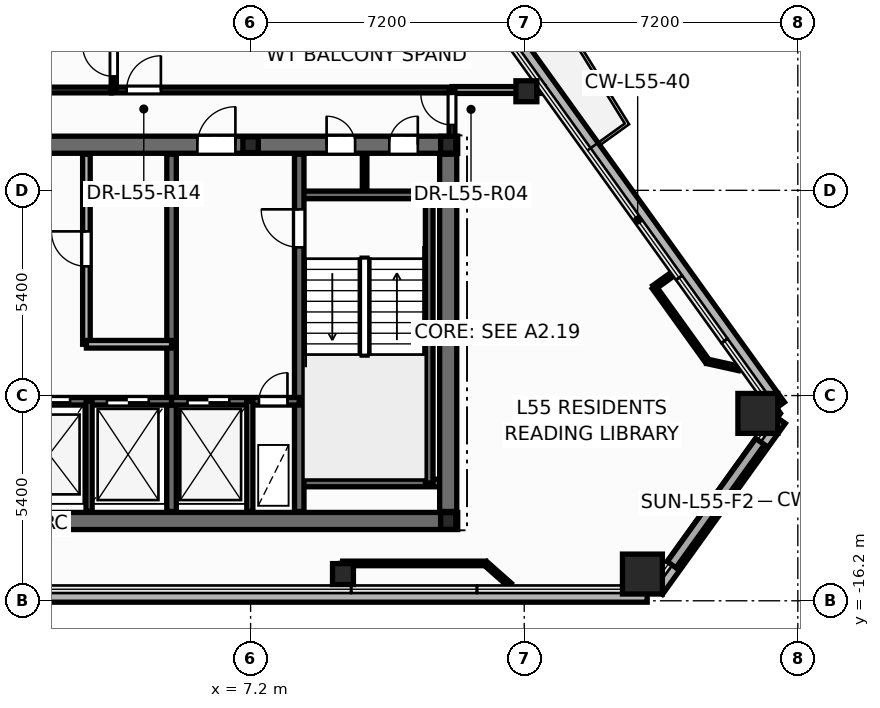
"""IFC4 building model, lengths in metres.
Left out: names, types, materials, properties, quantities, classifications, styles, units other than length and angle.
Written with IfcOpenShell. Run it as: python <this file> out.ifc"""

import sys

from ifc_helpers import new_model, si_unit, direction, frame, frame_2d, origin, origin_2d, place, context, subcontext, project, spatial, rectangle, hollow_rectangle, hollow_circle, i_section, extrude, element, fill, save


model = new_model("IFC4")
c1 = context("Model", 3, precision=1e-05, world=origin(), true_north=direction((0.0, 1.0)))
c2 = subcontext(c1, "Body", "Model", "MODEL_VIEW")
j1 = project(units=[si_unit("LENGTHUNIT", "METRE"), si_unit("PLANEANGLEUNIT", "RADIAN")], contexts=[c1])
p1 = place(None, origin())
s1 = spatial("IfcSite", under=j1, at=p1, CompositionType="ELEMENT")
p2 = place(p1, origin())
s2 = spatial("IfcBuilding", under=s1, at=p2, CompositionType="ELEMENT")
p3 = place(p2, frame((0.0, 0.0, 210.9)))
s3 = spatial("IfcBuildingStorey", under=s2, at=p3, CompositionType="ELEMENT", Elevation=210.9)
for number, where, z_axis, x_axis in (
    (1, (17.511, -15.497, 0.0), (0.0, 0.0, 1.0), (1.0, 0.0, 0.0)),
    (2, (20.548, -11.27, 0.0), (0.0, 0.0, 1.0), (1.0, 0.0, 0.0)),
):
    element("IfcColumn", number, at=place(p3, frame(where, z_axis=z_axis, x_axis=x_axis)), inside=s3, PredefinedType="COLUMN", context=c2, shape_type="SweptSolid", body=[
        extrude(hollow_rectangle(XDim=1.05, YDim=1.05, WallThickness=0.045, at=origin_2d()), origin(), (0.0, 0.0, 1.0), 3.6),
    ])
for number, where, z_axis, x_axis in (
    (3, (9.631, -15.497, 0.0), (0.0, 0.0, 1.0), (1.0, 0.0, 0.0)),
    (4, (14.457, -2.793, 0.0), (0.0, 0.0, 1.0), (1.0, 0.0, 0.0)),
):
    element("IfcColumn", number, at=place(p3, frame(where, z_axis=z_axis, x_axis=x_axis)), inside=s3, PredefinedType="COLUMN", context=c2, shape_type="SweptSolid", body=[
        extrude(hollow_circle(Radius=0.275, WallThickness=0.024, at=origin_2d()), origin(), (0.0, 0.0, 1.0), 3.6),
    ])
for number, where, z_axis, x_axis in (
    (5, (12.4, -14.1, 0.0), (0.0, 0.0, 1.0), (1.0, 0.0, 0.0)),
    (6, (12.4, -4.2, 0.0), (0.0, 0.0, 1.0), (1.0, 0.0, 0.0)),
):
    element("IfcColumn", number, at=place(p3, frame(where, z_axis=z_axis, x_axis=x_axis)), inside=s3, PredefinedType="COLUMN", context=c2, shape_type="SweptSolid", body=[
        extrude(i_section(OverallWidth=0.4, OverallDepth=0.44, WebThickness=0.028, FlangeThickness=0.04, at=origin_2d()), origin(), (0.0, 0.0, 1.0), 3.6),
    ])
p4 = place(p3, frame((7.2, -4.2, 0.0), z_axis=(0.0, 0.0, 1.0), x_axis=(1.0, 0.0, 0.0)))
e7 = element("IfcColumn", 7, at=p4, inside=s3, PredefinedType="PILASTER", context=c2, shape_type="SweptSolid", body=[
    extrude(i_section(OverallWidth=0.405, OverallDepth=0.414, WebThickness=0.022, FlangeThickness=0.032, at=origin_2d()), origin(), (0.0, 0.0, 1.0), 3.6),
])
p5 = place(p3, frame((-17.636, -16.057, -0.2), z_axis=(0.0, 0.0, 1.0), x_axis=(1.0, 0.0, 0.0)))
e8 = element("IfcWall", 8, at=p5, inside=s3, PredefinedType="PARAPET", context=c2, shape_type="SweptSolid", body=[
    extrude(rectangle(XDim=35.272, YDim=0.36, at=frame_2d((17.636, 0.0))), origin(), (0.0, 0.0, 1.0), 0.38),
])
p6 = place(p3, frame((17.893, -15.925, -0.2), z_axis=(0.0, 0.0, 1.0), x_axis=(0.583537933591, 0.812085882195, 0.0)))
e9 = element("IfcWall", 9, at=p6, inside=s3, PredefinedType="PARAPET", context=c2, shape_type="SweptSolid", body=[
    extrude(rectangle(XDim=5.538, YDim=0.36, at=frame_2d((2.769, 0.0))), origin(), (0.0, 0.0, 1.0), 0.38),
])
p7 = place(p3, frame((21.101, -11.079, -0.2), z_axis=(0.0, 0.0, 1.0), x_axis=(-0.583558674799, 0.81207097785, 0.0)))
e10 = element("IfcWall", 10, at=p7, inside=s3, PredefinedType="PARAPET", context=c2, shape_type="SweptSolid", body=[
    extrude(rectangle(XDim=12.289, YDim=0.36, at=frame_2d((6.144, 0.0))), origin(), (0.0, 0.0, 1.0), 0.38),
])
p8 = place(p3, frame((10.2, -5.52, 0.0), z_axis=(0.0, 0.0, 1.0), x_axis=(0.0, 1.0, 0.0)))
e11 = element("IfcWall", 11, at=p8, inside=s3, PredefinedType="PARTITIONING", context=c2, shape_type="SweptSolid", body=[
    extrude(rectangle(XDim=1.12, YDim=0.12, at=frame_2d((0.56, 0.0))), origin(), (0.0, 0.0, 1.0), 3.345),
])
p9 = place(p3, frame((-12.65, -14.1, 0.0), z_axis=(0.0, 0.0, 1.0), x_axis=(1.0, 0.0, 0.0)))
e12 = element("IfcWall", 12, at=p9, inside=s3, PredefinedType="SHEAR", context=c2, shape_type="SweptSolid", body=[
    extrude(rectangle(XDim=25.3, YDim=0.45, at=frame_2d((12.65, 0.0))), origin(), (0.0, 0.0, 1.0), 3.6),
])
p10 = place(p3, frame((-12.65, -4.2, 0.0), z_axis=(0.0, 0.0, 1.0), x_axis=(1.0, 0.0, 0.0)))
e13 = element("IfcWall", 13, at=p10, inside=s3, PredefinedType="SHEAR", context=c2, shape_type="SweptSolid", body=[
    extrude(rectangle(XDim=25.3, YDim=0.45, at=frame_2d((12.65, 0.0))), origin(), (0.0, 0.0, 1.0), 3.6),
])
p11 = place(p10, frame((1.85, 0.0, 0.0)))
e14 = element("IfcOpeningElement", 14, at=p11, cuts=e13, PredefinedType="OPENING", context=c2, shape_type="SweptSolid", body=[
    extrude(rectangle(XDim=0.756, YDim=2.054, at=frame_2d((0.375, 1.027))), frame((0.0, 0.235, 0.0), z_axis=(0.0, -1.0, 0.0), x_axis=(1.0, 0.0, 0.0)), (0.0, 0.0, 1.0), 0.47),
])
p12 = place(p10, frame((21.85, 0.0, 0.0)))
e15 = element("IfcOpeningElement", 15, at=p12, cuts=e13, PredefinedType="OPENING", context=c2, shape_type="SweptSolid", body=[
    extrude(rectangle(XDim=0.756, YDim=2.054, at=frame_2d((0.375, 1.027))), frame((0.0, 0.235, 0.0), z_axis=(0.0, -1.0, 0.0), x_axis=(1.0, 0.0, 0.0)), (0.0, 0.0, 1.0), 0.47),
])
p13 = place(p10, frame((23.5, 0.0, 0.0)))
e16 = element("IfcOpeningElement", 16, at=p13, cuts=e13, PredefinedType="OPENING", context=c2, shape_type="SweptSolid", body=[
    extrude(rectangle(XDim=0.756, YDim=2.054, at=frame_2d((0.375, 1.027))), frame((0.0, 0.235, 0.0), z_axis=(0.0, -1.0, 0.0), x_axis=(1.0, 0.0, 0.0)), (0.0, 0.0, 1.0), 0.47),
])
p14 = place(p10, frame((5.85, 0.0, 0.0)))
e17 = element("IfcOpeningElement", 17, at=p14, cuts=e13, PredefinedType="OPENING", context=c2, shape_type="SweptSolid", body=[
    extrude(rectangle(XDim=1.006, YDim=2.104, at=frame_2d((0.5, 1.052))), frame((0.0, 0.235, 0.0), z_axis=(0.0, -1.0, 0.0), x_axis=(1.0, 0.0, 0.0)), (0.0, 0.0, 1.0), 0.47),
])
p15 = place(p10, frame((10.35, 0.0, 0.0)))
e18 = element("IfcOpeningElement", 18, at=p15, cuts=e13, PredefinedType="OPENING", context=c2, shape_type="SweptSolid", body=[
    extrude(rectangle(XDim=1.406, YDim=2.154, at=frame_2d((0.7, 1.077))), frame((0.0, 0.235, 0.0), z_axis=(0.0, -1.0, 0.0), x_axis=(1.0, 0.0, 0.0)), (0.0, 0.0, 1.0), 0.47),
])
p16 = place(p10, frame((18.45, 0.0, 0.0)))
e19 = element("IfcOpeningElement", 19, at=p16, cuts=e13, PredefinedType="OPENING", context=c2, shape_type="SweptSolid", body=[
    extrude(rectangle(XDim=1.006, YDim=2.104, at=frame_2d((0.5, 1.052))), frame((0.0, 0.235, 0.0), z_axis=(0.0, -1.0, 0.0), x_axis=(1.0, 0.0, 0.0)), (0.0, 0.0, 1.0), 0.47),
])
for number, where, z_axis, x_axis in (
    (20, (8.48, -5.52, 0.0), (0.0, 0.0, 1.0), (1.0, 0.0, 0.0)),
    (21, (8.48, -13.1, 0.0), (0.0, 0.0, 1.0), (1.0, 0.0, 0.0)),
):
    element("IfcWall", number, at=place(p3, frame(where, z_axis=z_axis, x_axis=x_axis)), inside=s3, PredefinedType="SOLIDWALL", context=c2, shape_type="SweptSolid", body=[
        extrude(rectangle(XDim=3.87, YDim=0.2, at=frame_2d((1.935, 0.0))), origin(), (0.0, 0.0, 1.0), 3.6),
    ])
p17 = place(p3, frame((11.9, -13.1, 0.0), z_axis=(0.0, 0.0, 1.0), x_axis=(0.0, 1.0, 0.0)))
e22 = element("IfcWall", 22, at=p17, inside=s3, PredefinedType="SOLIDWALL", context=c2, shape_type="SweptSolid", body=[
    extrude(rectangle(XDim=7.58, YDim=0.2, at=frame_2d((3.79, 0.0))), origin(), (0.0, 0.0, 1.0), 3.6),
])
p18 = place(p3, frame((8.48, -13.85, 0.0), z_axis=(0.0, 0.0, 1.0), x_axis=(0.0, 1.0, 0.0)))
e23 = element("IfcWall", 23, at=p18, inside=s3, PredefinedType="SHEAR", context=c2, shape_type="SweptSolid", body=[
    extrude(rectangle(XDim=9.4, YDim=0.25, at=frame_2d((4.7, 0.0))), origin(), (0.0, 0.0, 1.0), 3.6),
])
p19 = place(p18, frame((6.95, 0.0, 0.0)))
e24 = element("IfcOpeningElement", 24, at=p19, cuts=e23, PredefinedType="OPENING", context=c2, shape_type="SweptSolid", body=[
    extrude(rectangle(XDim=1.006, YDim=2.104, at=frame_2d((0.5, 1.052))), frame((0.0, 0.135, 0.0), z_axis=(0.0, -1.0, 0.0), x_axis=(1.0, 0.0, 0.0)), (0.0, 0.0, 1.0), 0.27),
])
p20 = place(p3, frame((5.12, -13.85, 0.0), z_axis=(0.0, 0.0, 1.0), x_axis=(0.0, 1.0, 0.0)))
e25 = element("IfcWall", 25, at=p20, inside=s3, PredefinedType="SHEAR", context=c2, shape_type="SweptSolid", body=[
    extrude(rectangle(XDim=9.4, YDim=0.25, at=frame_2d((4.7, 0.0))), origin(), (0.0, 0.0, 1.0), 3.6),
])
p21 = place(p3, frame((-5.12, -10.95, 0.0), z_axis=(0.0, 0.0, 1.0), x_axis=(1.0, 0.0, 0.0)))
e26 = element("IfcWall", 26, at=p21, inside=s3, PredefinedType="SOLIDWALL", context=c2, shape_type="SweptSolid", body=[
    extrude(rectangle(XDim=10.24, YDim=0.2, at=frame_2d((5.12, 0.0))), origin(), (0.0, 0.0, 1.0), 3.6),
])
p22 = place(p21, frame((0.6, 0.0, 0.0)))
e27 = element("IfcOpeningElement", 27, at=p22, cuts=e26, PredefinedType="OPENING", context=c2, shape_type="SweptSolid", body=[
    extrude(rectangle(XDim=1.106, YDim=2.104, at=frame_2d((0.55, 1.052))), frame((0.0, 0.11, 0.0), z_axis=(0.0, -1.0, 0.0), x_axis=(1.0, 0.0, 0.0)), (0.0, 0.0, 1.0), 0.22),
])
p23 = place(p21, frame((2.67, 0.0, 0.0)))
e28 = element("IfcOpeningElement", 28, at=p23, cuts=e26, PredefinedType="OPENING", context=c2, shape_type="SweptSolid", body=[
    extrude(rectangle(XDim=1.106, YDim=2.104, at=frame_2d((0.55, 1.052))), frame((0.0, 0.11, 0.0), z_axis=(0.0, -1.0, 0.0), x_axis=(1.0, 0.0, 0.0)), (0.0, 0.0, 1.0), 0.22),
])
p24 = place(p21, frame((4.57, 0.0, 0.0)))
e29 = element("IfcOpeningElement", 29, at=p24, cuts=e26, PredefinedType="OPENING", context=c2, shape_type="SweptSolid", body=[
    extrude(rectangle(XDim=1.106, YDim=2.104, at=frame_2d((0.55, 1.052))), frame((0.0, 0.11, 0.0), z_axis=(0.0, -1.0, 0.0), x_axis=(1.0, 0.0, 0.0)), (0.0, 0.0, 1.0), 0.22),
])
p25 = place(p21, frame((6.47, 0.0, 0.0)))
e30 = element("IfcOpeningElement", 30, at=p25, cuts=e26, PredefinedType="OPENING", context=c2, shape_type="SweptSolid", body=[
    extrude(rectangle(XDim=1.106, YDim=2.104, at=frame_2d((0.55, 1.052))), frame((0.0, 0.11, 0.0), z_axis=(0.0, -1.0, 0.0), x_axis=(1.0, 0.0, 0.0)), (0.0, 0.0, 1.0), 0.22),
])
p26 = place(p21, frame((8.54, 0.0, 0.0)))
e31 = element("IfcOpeningElement", 31, at=p26, cuts=e26, PredefinedType="OPENING", context=c2, shape_type="SweptSolid", body=[
    extrude(rectangle(XDim=1.106, YDim=2.104, at=frame_2d((0.55, 1.052))), frame((0.0, 0.11, 0.0), z_axis=(0.0, -1.0, 0.0), x_axis=(1.0, 0.0, 0.0)), (0.0, 0.0, 1.0), 0.22),
])
p27 = place(p3, frame((5.12, -10.95, 0.0), z_axis=(0.0, 0.0, 1.0), x_axis=(1.0, 0.0, 0.0)))
e32 = element("IfcWall", 32, at=p27, inside=s3, PredefinedType="SOLIDWALL", context=c2, shape_type="SweptSolid", body=[
    extrude(rectangle(XDim=3.36, YDim=0.2, at=frame_2d((1.68, 0.0))), origin(), (0.0, 0.0, 1.0), 3.6),
])
p28 = place(p27, frame((0.42, 0.0, 0.0)))
e33 = element("IfcOpeningElement", 33, at=p28, cuts=e32, PredefinedType="OPENING", context=c2, shape_type="SweptSolid", body=[
    extrude(rectangle(XDim=1.106, YDim=2.104, at=frame_2d((0.55, 1.052))), frame((0.0, 0.11, 0.0), z_axis=(0.0, -1.0, 0.0), x_axis=(1.0, 0.0, 0.0)), (0.0, 0.0, 1.0), 0.22),
])
p29 = place(p27, frame((2.3, 0.0, 0.0)))
e34 = element("IfcOpeningElement", 34, at=p29, cuts=e32, PredefinedType="OPENING", context=c2, shape_type="SweptSolid", body=[
    extrude(rectangle(XDim=0.756, YDim=2.054, at=frame_2d((0.375, 1.027))), frame((0.0, 0.11, 0.0), z_axis=(0.0, -1.0, 0.0), x_axis=(1.0, 0.0, 0.0)), (0.0, 0.0, 1.0), 0.22),
])
for number, where, z_axis, x_axis in (
    (35, (7.18, -13.85, 0.0), (0.0, 0.0, 1.0), (0.0, 1.0, 0.0)),
    (36, (2.95, -13.85, 0.0), (0.0, 0.0, 1.0), (0.0, 1.0, 0.0)),
):
    element("IfcWall", number, at=place(p3, frame(where, z_axis=z_axis, x_axis=x_axis)), inside=s3, PredefinedType="PARTITIONING", context=c2, shape_type="SweptSolid", body=[
        extrude(rectangle(XDim=2.9, YDim=0.16, at=frame_2d((1.45, 0.0))), origin(), (0.0, 0.0, 1.0), 2.47),
    ])
p30 = place(p3, frame((12.4, -13.85, 0.0), z_axis=(0.0, 0.0, 1.0), x_axis=(0.0, 1.0, 0.0)))
e37 = element("IfcWall", 37, at=p30, inside=s3, PredefinedType="SHEAR", context=c2, shape_type="SweptSolid", body=[
    extrude(rectangle(XDim=9.4, YDim=0.45, at=frame_2d((4.7, 0.0))), origin(), (0.0, 0.0, 1.0), 3.6),
])
p31 = place(p3, frame((2.88, -9.45, 0.0), z_axis=(0.0, 0.0, 1.0), x_axis=(0.0, 1.0, 0.0)))
e38 = element("IfcWall", 38, at=p31, inside=s3, PredefinedType="SOLIDWALL", context=c2, shape_type="SweptSolid", body=[
    extrude(rectangle(XDim=5.0, YDim=0.2, at=frame_2d((2.5, 0.0))), origin(), (0.0, 0.0, 1.0), 3.345),
])
p32 = place(p31, frame((2.05, 0.0, 0.0)))
e39 = element("IfcOpeningElement", 39, at=p32, cuts=e38, PredefinedType="OPENING", context=c2, shape_type="SweptSolid", body=[
    extrude(rectangle(XDim=0.926, YDim=2.104, at=frame_2d((0.46, 1.052))), frame((0.0, 0.11, 0.0), z_axis=(0.0, -1.0, 0.0), x_axis=(1.0, 0.0, 0.0)), (0.0, 0.0, 1.0), 0.22),
])
p33 = place(p3, frame((2.88, -9.45, 0.0), z_axis=(0.0, 0.0, 1.0), x_axis=(1.0, 0.0, 0.0)))
e40 = element("IfcWall", 40, at=p33, inside=s3, PredefinedType="SOLIDWALL", context=c2, shape_type="SweptSolid", body=[
    extrude(rectangle(XDim=2.24, YDim=0.2, at=frame_2d((1.12, 0.0))), origin(), (0.0, 0.0, 1.0), 3.345),
])
p34 = place(p3, frame((3.54, -2.76, 0.0), z_axis=(0.0, 0.0, 1.0), x_axis=(1.0, 0.0, 0.0)))
e41 = element("IfcWall", 41, at=p34, inside=s3, PredefinedType="PARTITIONING", context=c2, shape_type="SweptSolid", body=[
    extrude(rectangle(XDim=8.96, YDim=0.15, at=frame_2d((4.48, 0.0))), origin(), (0.0, 0.0, 1.0), 2.32),
])
p35 = place(p34, frame((0.399, 0.0, 0.0)))
e42 = element("IfcOpeningElement", 42, at=p35, cuts=e41, PredefinedType="OPENING", context=c2, shape_type="SweptSolid", body=[
    extrude(rectangle(XDim=0.906, YDim=2.104, at=frame_2d((0.45, 1.052))), frame((0.0, 0.085, 0.0), z_axis=(0.0, -1.0, 0.0), x_axis=(1.0, 0.0, 0.0)), (0.0, 0.0, 1.0), 0.17),
])
p36 = place(p3, frame((9.623, -15.217, 0.0), z_axis=(0.0, 0.0, 1.0), x_axis=(1.0, 0.0, 0.0)))
e43 = element("IfcWall", 43, at=p36, inside=s3, PredefinedType="PARTITIONING", context=c2, shape_type="SweptSolid", body=[
    extrude(rectangle(XDim=3.757, YDim=0.12, at=frame_2d((1.879, 0.0))), origin(), (0.0, 0.0, 1.0), 2.787),
])
p37 = place(p3, frame((3.6, -2.76, 0.0), z_axis=(0.0, 0.0, 1.0), x_axis=(0.0, 1.0, 0.0)))
e44 = element("IfcWall", 44, at=p37, inside=s3, PredefinedType="PARTITIONING", context=c2, shape_type="SweptSolid", body=[
    extrude(rectangle(XDim=2.92, YDim=0.135, at=frame_2d((1.46, 0.0))), origin(), (0.0, 0.0, 1.0), 2.965),
])
p38 = place(p37, frame((0.357, 0.0, 0.0)))
e45 = element("IfcOpeningElement", 45, at=p38, cuts=e44, PredefinedType="OPENING", context=c2, shape_type="SweptSolid", body=[
    extrude(rectangle(XDim=0.826, YDim=2.104, at=frame_2d((0.41, 1.052))), frame((0.0, 0.078, 0.0), z_axis=(0.0, -1.0, 0.0), x_axis=(1.0, 0.0, 0.0)), (0.0, 0.0, 1.0), 0.155),
])
p39 = place(p3, frame((-1.538, -2.76, 0.0), z_axis=(0.0, 0.0, 1.0), x_axis=(1.0, 0.0, 0.0)))
e46 = element("IfcWall", 46, at=p39, inside=s3, PredefinedType="PARTITIONING", context=c2, shape_type="SweptSolid", body=[
    extrude(rectangle(XDim=5.076, YDim=0.15, at=frame_2d((2.538, 0.0))), origin(), (0.0, 0.0, 1.0), 2.32),
])
p40 = place(p3, frame((12.5, -2.76, 0.0), z_axis=(0.0, 0.0, 1.0), x_axis=(1.0, 0.0, 0.0)))
e47 = element("IfcWall", 47, at=p40, inside=s3, PredefinedType="PARTITIONING", context=c2, shape_type="SweptSolid", body=[
    extrude(rectangle(XDim=2.426, YDim=0.18, at=frame_2d((1.213, 0.0))), origin(), (0.0, 0.0, 1.0), 2.62),
])
p41 = place(p3, frame((19.221, -9.902, 0.0), z_axis=(0.0, 0.0, 1.0), x_axis=(-0.583583646273, 0.81205303263, 0.0)))
e48 = element("IfcWall", 48, at=p41, inside=s3, PredefinedType="PARTITIONING", context=c2, shape_type="SweptSolid", body=[
    extrude(rectangle(XDim=2.4, YDim=0.12, at=frame_2d((1.2, 0.0))), origin(), (0.0, 0.0, 1.0), 2.32),
])
p42 = place(p3, frame((12.5, -4.24, 0.0), z_axis=(0.0, 0.0, 1.0), x_axis=(0.0, 1.0, 0.0)))
e49 = element("IfcWall", 49, at=p42, inside=s3, PredefinedType="PARTITIONING", context=c2, shape_type="SweptSolid", body=[
    extrude(rectangle(XDim=1.48, YDim=0.15, at=frame_2d((0.74, 0.0))), origin(), (0.0, 0.0, 1.0), 2.32),
])
p43 = place(p42, frame((0.56, 0.0, 0.0)))
e50 = element("IfcOpeningElement", 50, at=p43, cuts=e49, PredefinedType="OPENING", context=c2, shape_type="SweptSolid", body=[
    extrude(rectangle(XDim=0.826, YDim=2.104, at=frame_2d((0.41, 1.052))), frame((0.0, 0.085, 0.0), z_axis=(0.0, -1.0, 0.0), x_axis=(1.0, 0.0, 0.0)), (0.0, 0.0, 1.0), 0.17),
])
p44 = place(p3, frame((13.381, -15.217, 0.0), z_axis=(0.0, 0.0, 1.0), x_axis=(0.749620225682, -0.661868202324, 0.0)))
e51 = element("IfcWall", 51, at=p44, inside=s3, PredefinedType="PARTITIONING", context=c2, shape_type="SweptSolid", body=[
    extrude(rectangle(XDim=0.851, YDim=0.12, at=frame_2d((0.426, 0.0))), origin(), (0.0, 0.0, 1.0), 2.787),
])
p45 = place(p3, frame((20.052, -10.085, 0.0), z_axis=(0.0, 0.0, 1.0), x_axis=(-0.976382442069, 0.216049361998, 0.0)))
e52 = element("IfcWall", 52, at=p45, inside=s3, PredefinedType="PARTITIONING", context=c2, shape_type="SweptSolid", body=[
    extrude(rectangle(XDim=0.851, YDim=0.12, at=frame_2d((0.425, 0.0))), origin(), (0.0, 0.0, 1.0), 2.32),
])
for number, where, z_axis, x_axis in (
    (53, (17.82, -7.953, 0.0), (0.0, 0.0, 1.0), (0.812, 0.584, 0.0)),
    (54, (9.623, -15.887, 0.0), (0.0, 0.0, 1.0), (0.0, 1.0, 0.0)),
):
    element("IfcWall", number, at=place(p3, frame(where, z_axis=z_axis, x_axis=x_axis)), inside=s3, PredefinedType="PARTITIONING", context=c2, shape_type="SweptSolid", body=[
        extrude(rectangle(XDim=0.67, YDim=0.12, at=frame_2d((0.335, 0.0))), origin(), (0.0, 0.0, 1.0), 2.787),
    ])
p46 = place(p32, origin())
e55 = element("IfcDoor", 55, at=p46, inside=s3, OperationType="SINGLE_SWING_RIGHT", PredefinedType="DOOR", context=c2, shape_type="SweptSolid", body=[
    extrude(rectangle(XDim=0.92, YDim=2.1, at=frame_2d((0.46, 1.05))), frame((0.0, 0.025, 0.0), z_axis=(0.0, -1.0, 0.0), x_axis=(1.0, 0.0, 0.0)), (0.0, 0.0, 1.0), 0.05),
])
fill(e39, e55)
p47 = place(p19, origin())
e56 = element("IfcDoor", 56, at=p47, inside=s3, OperationType="SINGLE_SWING_RIGHT", PredefinedType="DOOR", context=c2, shape_type="SweptSolid", body=[
    extrude(rectangle(XDim=1.0, YDim=2.1, at=frame_2d((0.5, 1.05))), frame((0.0, 0.025, 0.0), z_axis=(0.0, -1.0, 0.0), x_axis=(1.0, 0.0, 0.0)), (0.0, 0.0, 1.0), 0.05),
])
fill(e24, e56)
p48 = place(p28, origin())
e57 = element("IfcDoor", 57, at=p48, inside=s3, OperationType="DOUBLE_DOOR_SLIDING", PredefinedType="DOOR", context=c2, shape_type="SweptSolid", body=[
    extrude(rectangle(XDim=1.1, YDim=2.1, at=frame_2d((0.55, 1.05))), frame((0.0, 0.025, 0.0), z_axis=(0.0, -1.0, 0.0), x_axis=(1.0, 0.0, 0.0)), (0.0, 0.0, 1.0), 0.05),
])
fill(e33, e57)
p49 = place(p29, origin())
e58 = element("IfcDoor", 58, at=p49, inside=s3, OperationType="SINGLE_SWING_RIGHT", PredefinedType="DOOR", context=c2, shape_type="SweptSolid", body=[
    extrude(rectangle(XDim=0.75, YDim=2.05, at=frame_2d((0.375, 1.025))), frame((0.0, 0.025, 0.0), z_axis=(0.0, -1.0, 0.0), x_axis=(1.0, 0.0, 0.0)), (0.0, 0.0, 1.0), 0.05),
])
fill(e34, e58)
p50 = place(p25, origin())
e59 = element("IfcDoor", 59, at=p50, inside=s3, OperationType="DOUBLE_DOOR_SLIDING", PredefinedType="DOOR", context=c2, shape_type="SweptSolid", body=[
    extrude(rectangle(XDim=1.1, YDim=2.1, at=frame_2d((0.55, 1.05))), frame((0.0, 0.025, 0.0), z_axis=(0.0, -1.0, 0.0), x_axis=(1.0, 0.0, 0.0)), (0.0, 0.0, 1.0), 0.05),
])
fill(e30, e59)
p51 = place(p26, origin())
e60 = element("IfcDoor", 60, at=p51, inside=s3, OperationType="DOUBLE_DOOR_SLIDING", PredefinedType="DOOR", context=c2, shape_type="SweptSolid", body=[
    extrude(rectangle(XDim=1.1, YDim=2.1, at=frame_2d((0.55, 1.05))), frame((0.0, 0.025, 0.0), z_axis=(0.0, -1.0, 0.0), x_axis=(1.0, 0.0, 0.0)), (0.0, 0.0, 1.0), 0.05),
])
fill(e31, e60)
p52 = place(p12, origin())
e61 = element("IfcDoor", 61, at=p52, inside=s3, OperationType="SINGLE_SWING_LEFT", PredefinedType="DOOR", context=c2, shape_type="SweptSolid", body=[
    extrude(rectangle(XDim=0.75, YDim=2.05, at=frame_2d((0.375, 1.025))), frame((0.0, 0.025, 0.0), z_axis=(0.0, -1.0, 0.0), x_axis=(1.0, 0.0, 0.0)), (0.0, 0.0, 1.0), 0.05),
])
fill(e15, e61)
p53 = place(p13, origin())
e62 = element("IfcDoor", 62, at=p53, inside=s3, OperationType="SINGLE_SWING_RIGHT", PredefinedType="DOOR", context=c2, shape_type="SweptSolid", body=[
    extrude(rectangle(XDim=0.75, YDim=2.05, at=frame_2d((0.375, 1.025))), frame((0.0, 0.025, 0.0), z_axis=(0.0, -1.0, 0.0), x_axis=(1.0, 0.0, 0.0)), (0.0, 0.0, 1.0), 0.05),
])
fill(e16, e62)
p54 = place(p16, origin())
e63 = element("IfcDoor", 63, at=p54, inside=s3, OperationType="SINGLE_SWING_RIGHT", PredefinedType="DOOR", context=c2, shape_type="SweptSolid", body=[
    extrude(rectangle(XDim=1.0, YDim=2.1, at=frame_2d((0.5, 1.05))), frame((0.0, 0.025, 0.0), z_axis=(0.0, -1.0, 0.0), x_axis=(1.0, 0.0, 0.0)), (0.0, 0.0, 1.0), 0.05),
])
fill(e19, e63)
p55 = place(p43, origin())
e64 = element("IfcDoor", 64, at=p55, inside=s3, OperationType="SINGLE_SWING_RIGHT", PredefinedType="DOOR", context=c2, shape_type="SweptSolid", body=[
    extrude(rectangle(XDim=0.82, YDim=2.1, at=frame_2d((0.41, 1.05))), frame((0.0, 0.025, 0.0), z_axis=(0.0, -1.0, 0.0), x_axis=(1.0, 0.0, 0.0)), (0.0, 0.0, 1.0), 0.05),
])
fill(e50, e64)
p56 = place(p38, origin())
e65 = element("IfcDoor", 65, at=p56, inside=s3, OperationType="SINGLE_SWING_RIGHT", PredefinedType="DOOR", context=c2, shape_type="SweptSolid", body=[
    extrude(rectangle(XDim=0.82, YDim=2.1, at=frame_2d((0.41, 1.05))), frame((0.0, 0.025, 0.0), z_axis=(0.0, -1.0, 0.0), x_axis=(1.0, 0.0, 0.0)), (0.0, 0.0, 1.0), 0.05),
])
fill(e45, e65)
p57 = place(p35, origin())
e66 = element("IfcDoor", 66, at=p57, inside=s3, OperationType="SINGLE_SWING_RIGHT", PredefinedType="DOOR", context=c2, shape_type="SweptSolid", body=[
    extrude(rectangle(XDim=0.9, YDim=2.1, at=frame_2d((0.45, 1.05))), frame((0.0, 0.025, 0.0), z_axis=(0.0, -1.0, 0.0), x_axis=(1.0, 0.0, 0.0)), (0.0, 0.0, 1.0), 0.05),
])
fill(e42, e66)
save(model, sys.argv[1])
